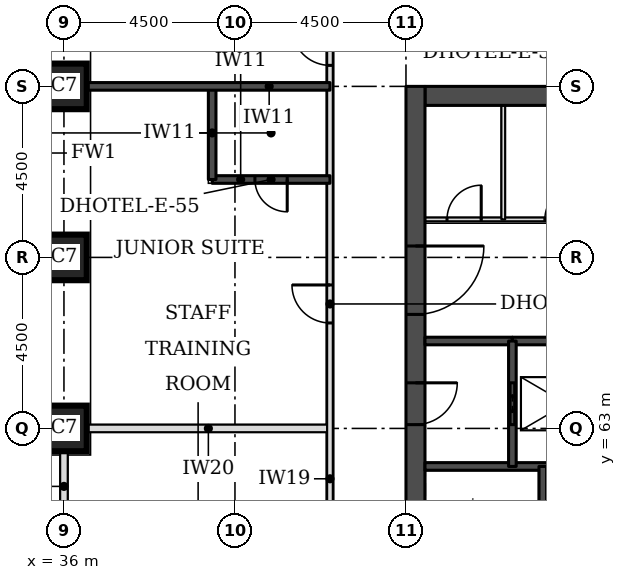
"""IFC4 building model, lengths in metres.
Left out: names, types, materials, properties, quantities, classifications, styles, units other than length and angle.
Written with IfcOpenShell. Run it as: python <this file> out.ifc"""

import sys

from ifc_helpers import new_model, si_unit, direction, frame, frame_2d, origin, origin_2d, place, context, subcontext, project, spatial, rectangle, extrude, element, fill, save


model = new_model("IFC4")
c1 = context("Model", 3, precision=1e-05, world=origin(), true_north=direction((0.0, 1.0)))
c2 = subcontext(c1, "Body", "Model", "MODEL_VIEW")
j1 = project(units=[si_unit("LENGTHUNIT", "METRE"), si_unit("PLANEANGLEUNIT", "RADIAN")], contexts=[c1])
p1 = place(None, origin())
s1 = spatial("IfcSite", under=j1, at=p1, CompositionType="ELEMENT")
p2 = place(p1, origin())
s2 = spatial("IfcBuilding", under=s1, at=p2, CompositionType="ELEMENT")
p3 = place(p2, frame((0.0, 0.0, 39.6)))
s3 = spatial("IfcBuildingStorey", under=s2, at=p3, CompositionType="ELEMENT", Elevation=39.6)
for number, where, z_axis, x_axis in (
    (1, (36.0, 63.0, 0.0), (0.0, 0.0, 1.0), (1.0, 0.0, 0.0)),
    (2, (36.0, 67.5, 0.0), (0.0, 0.0, 1.0), (1.0, 0.0, 0.0)),
    (3, (36.0, 72.0, 0.0), (0.0, 0.0, 1.0), (1.0, 0.0, 0.0)),
):
    element("IfcColumn", number, at=place(p3, frame(where, z_axis=z_axis, x_axis=x_axis)), inside=s3, PredefinedType="COLUMN", context=c2, shape_type="SweptSolid", body=[
        extrude(rectangle(XDim=1.2, YDim=1.2, at=origin_2d()), origin(), (0.0, 0.0, 1.0), 3.3),
    ])
p4 = place(p3, frame((45.5, 71.75, 0.0), z_axis=(0.0, 0.0, 1.0), x_axis=(1.0, 0.0, 0.0)))
e4 = element("IfcWall", 4, at=p4, inside=s3, PredefinedType="SHEAR", context=c2, shape_type="SweptSolid", body=[
    extrude(rectangle(XDim=21.5, YDim=0.5, at=frame_2d((10.75, 0.0))), origin(), (0.0, 0.0, 1.0), 3.3),
])
p5 = place(p3, frame((45.25, 49.5, 0.0), z_axis=(0.0, 0.0, 1.0), x_axis=(0.0, 1.0, 0.0)))
e5 = element("IfcWall", 5, at=p5, inside=s3, PredefinedType="SHEAR", context=c2, shape_type="SweptSolid", body=[
    extrude(rectangle(XDim=22.5, YDim=0.5, at=frame_2d((11.25, 0.0))), origin(), (0.0, 0.0, 1.0), 3.3),
])
p6 = place(p5, frame((4.2, 0.0, 0.0)))
e6 = element("IfcOpeningElement", 6, at=p6, cuts=e5, PredefinedType="OPENING", context=c2, shape_type="SweptSolid", body=[
    extrude(rectangle(XDim=1.8, YDim=2.1, at=frame_2d((0.9, 1.05))), frame((0.0, 0.26, 0.0), z_axis=(0.0, -1.0, 0.0), x_axis=(1.0, 0.0, 0.0)), (0.0, 0.0, 1.0), 0.52),
])
p7 = place(p5, frame((6.9, 0.0, 0.0)))
e7 = element("IfcOpeningElement", 7, at=p7, cuts=e5, PredefinedType="OPENING", context=c2, shape_type="SweptSolid", body=[
    extrude(rectangle(XDim=1.1, YDim=2.1, at=frame_2d((0.55, 1.05))), frame((0.0, 0.26, 0.0), z_axis=(0.0, -1.0, 0.0), x_axis=(1.0, 0.0, 0.0)), (0.0, 0.0, 1.0), 0.52),
])
p8 = place(p5, frame((13.6, 0.0, 0.0)))
e8 = element("IfcOpeningElement", 8, at=p8, cuts=e5, PredefinedType="OPENING", context=c2, shape_type="SweptSolid", body=[
    extrude(rectangle(XDim=1.1, YDim=2.1, at=frame_2d((0.55, 1.05))), frame((0.0, 0.26, 0.0), z_axis=(0.0, -1.0, 0.0), x_axis=(1.0, 0.0, 0.0)), (0.0, 0.0, 1.0), 0.52),
])
p9 = place(p5, frame((16.5, 0.0, 0.0)))
e9 = element("IfcOpeningElement", 9, at=p9, cuts=e5, PredefinedType="OPENING", context=c2, shape_type="SweptSolid", body=[
    extrude(rectangle(XDim=1.8, YDim=2.1, at=frame_2d((0.9, 1.05))), frame((0.0, 0.26, 0.0), z_axis=(0.0, -1.0, 0.0), x_axis=(1.0, 0.0, 0.0)), (0.0, 0.0, 1.0), 0.52),
])
p10 = place(p3, frame((36.0, 57.35, 0.0), z_axis=(0.0, 0.0, 1.0), x_axis=(0.0, 1.0, 0.0)))
e10 = element("IfcWall", 10, at=p10, inside=s3, PredefinedType="PARTITIONING", context=c2, shape_type="SweptSolid", body=[
    extrude(rectangle(XDim=5.05, YDim=0.2, at=frame_2d((2.525, 0.0))), origin(), (0.0, 0.0, 1.0), 2.33),
])
p11 = place(p3, frame((36.6, 63.0, 0.0), z_axis=(0.0, 0.0, 1.0), x_axis=(1.0, 0.0, 0.0)))
e11 = element("IfcWall", 11, at=p11, inside=s3, PredefinedType="PARTITIONING", context=c2, shape_type="SweptSolid", body=[
    extrude(rectangle(XDim=6.4, YDim=0.2, at=frame_2d((3.2, 0.0))), origin(), (0.0, 0.0, 1.0), 3.08),
])
p12 = place(p3, frame((43.0, 57.35, 0.0), z_axis=(0.0, 0.0, 1.0), x_axis=(0.0, 1.0, 0.0)))
e12 = element("IfcWall", 12, at=p12, inside=s3, PredefinedType="PARTITIONING", context=c2, shape_type="SweptSolid", body=[
    extrude(rectangle(XDim=16.65, YDim=0.15, at=frame_2d((8.325, 0.0))), origin(), (0.0, 0.0, 1.0), 3.08),
])
p13 = place(p12, frame((8.425, 0.0, 0.0)))
e13 = element("IfcOpeningElement", 13, at=p13, cuts=e12, PredefinedType="OPENING", context=c2, shape_type="SweptSolid", body=[
    extrude(rectangle(XDim=1.0, YDim=2.1, at=frame_2d((0.5, 1.05))), frame((0.0, 0.085, 0.0), z_axis=(0.0, -1.0, 0.0), x_axis=(1.0, 0.0, 0.0)), (0.0, 0.0, 1.0), 0.17),
])
p14 = place(p12, frame((15.203, 0.0, 0.0)))
e14 = element("IfcOpeningElement", 14, at=p14, cuts=e12, PredefinedType="OPENING", context=c2, shape_type="SweptSolid", body=[
    extrude(rectangle(XDim=1.0, YDim=2.1, at=frame_2d((0.5, 1.05))), frame((0.0, 0.085, 0.0), z_axis=(0.0, -1.0, 0.0), x_axis=(1.0, 0.0, 0.0)), (0.0, 0.0, 1.0), 0.17),
])
p15 = place(p3, frame((39.9, 69.55, 0.0), z_axis=(0.0, 0.0, 1.0), x_axis=(1.0, 0.0, 0.0)))
e15 = element("IfcWall", 15, at=p15, inside=s3, PredefinedType="SOLIDWALL", context=c2, shape_type="SweptSolid", body=[
    extrude(rectangle(XDim=3.1, YDim=0.2, at=frame_2d((1.55, 0.0))), origin(), (0.0, 0.0, 1.0), 3.08),
])
p16 = place(p15, frame((1.125, 0.0, 0.0)))
e16 = element("IfcOpeningElement", 16, at=p16, cuts=e15, PredefinedType="OPENING", context=c2, shape_type="SweptSolid", body=[
    extrude(rectangle(XDim=0.85, YDim=2.1, at=frame_2d((0.425, 1.05))), frame((0.0, 0.11, 0.0), z_axis=(0.0, -1.0, 0.0), x_axis=(1.0, 0.0, 0.0)), (0.0, 0.0, 1.0), 0.22),
])
p17 = place(p3, frame((39.9, 69.55, 0.0), z_axis=(0.0, 0.0, 1.0), x_axis=(0.0, 1.0, 0.0)))
e17 = element("IfcWall", 17, at=p17, inside=s3, PredefinedType="SOLIDWALL", context=c2, shape_type="SweptSolid", body=[
    extrude(rectangle(XDim=2.45, YDim=0.2, at=frame_2d((1.225, 0.0))), origin(), (0.0, 0.0, 1.0), 3.08),
])
p18 = place(p3, frame((36.6, 72.0, 0.0), z_axis=(0.0, 0.0, 1.0), x_axis=(1.0, 0.0, 0.0)))
e18 = element("IfcWall", 18, at=p18, inside=s3, PredefinedType="SOLIDWALL", context=c2, shape_type="SweptSolid", body=[
    extrude(rectangle(XDim=6.4, YDim=0.2, at=frame_2d((3.2, 0.0))), origin(), (0.0, 0.0, 1.0), 3.08),
])
p19 = place(p3, frame((45.5, 62.0, 0.0), z_axis=(0.0, 0.0, 1.0), x_axis=(1.0, 0.0, 0.0)))
e19 = element("IfcWall", 19, at=p19, inside=s3, PredefinedType="SOLIDWALL", context=c2, shape_type="SweptSolid", body=[
    extrude(rectangle(XDim=5.15, YDim=0.2, at=frame_2d((2.575, 0.0))), origin(), (0.0, 0.0, 1.0), 3.08),
])
p20 = place(p3, frame((45.5, 65.3, 0.0), z_axis=(0.0, 0.0, 1.0), x_axis=(1.0, 0.0, 0.0)))
e20 = element("IfcWall", 20, at=p20, inside=s3, PredefinedType="SOLIDWALL", context=c2, shape_type="SweptSolid", body=[
    extrude(rectangle(XDim=2.3, YDim=0.2, at=frame_2d((1.15, 0.0))), origin(), (0.0, 0.0, 1.0), 3.08),
])
p21 = place(p3, frame((47.8, 65.3, 0.0), z_axis=(0.0, 0.0, 1.0), x_axis=(1.0, 0.0, 0.0)))
e21 = element("IfcWall", 21, at=p21, inside=s3, PredefinedType="SOLIDWALL", context=c2, shape_type="SweptSolid", body=[
    extrude(rectangle(XDim=16.9, YDim=0.2, at=frame_2d((8.45, 0.0))), origin(), (0.0, 0.0, 1.0), 3.08),
])
p22 = place(p3, frame((45.5, 68.5, 0.0), z_axis=(0.0, 0.0, 1.0), x_axis=(1.0, 0.0, 0.0)))
e22 = element("IfcWall", 22, at=p22, inside=s3, PredefinedType="PARTITIONING", context=c2, shape_type="SweptSolid", body=[
    extrude(rectangle(XDim=5.15, YDim=0.1, at=frame_2d((2.575, 0.0))), origin(), (0.0, 0.0, 1.0), 3.08),
])
p23 = place(p22, frame((0.58, 0.0, 0.0)))
e23 = element("IfcOpeningElement", 23, at=p23, cuts=e22, PredefinedType="OPENING", context=c2, shape_type="SweptSolid", body=[
    extrude(rectangle(XDim=0.9, YDim=2.1, at=frame_2d((0.45, 1.05))), frame((0.0, 0.06, 0.0), z_axis=(0.0, -1.0, 0.0), x_axis=(1.0, 0.0, 0.0)), (0.0, 0.0, 1.0), 0.12),
])
p24 = place(p22, frame((3.155, 0.0, 0.0)))
e24 = element("IfcOpeningElement", 24, at=p24, cuts=e22, PredefinedType="OPENING", context=c2, shape_type="SweptSolid", body=[
    extrude(rectangle(XDim=0.9, YDim=2.1, at=frame_2d((0.45, 1.05))), frame((0.0, 0.06, 0.0), z_axis=(0.0, -1.0, 0.0), x_axis=(1.0, 0.0, 0.0)), (0.0, 0.0, 1.0), 0.12),
])
p25 = place(p3, frame((47.56, 68.5, 0.0), z_axis=(0.0, 0.0, 1.0), x_axis=(0.0, 1.0, 0.0)))
e25 = element("IfcWall", 25, at=p25, inside=s3, PredefinedType="PARTITIONING", context=c2, shape_type="SweptSolid", body=[
    extrude(rectangle(XDim=3.0, YDim=0.1, at=frame_2d((1.5, 0.0))), origin(), (0.0, 0.0, 1.0), 3.08),
])
p26 = place(p3, frame((47.8, 62.0, 0.0), z_axis=(0.0, 0.0, 1.0), x_axis=(0.0, 1.0, 0.0)))
e26 = element("IfcWall", 26, at=p26, inside=s3, PredefinedType="SOLIDWALL", context=c2, shape_type="SweptSolid", body=[
    extrude(rectangle(XDim=3.3, YDim=0.2, at=frame_2d((1.65, 0.0))), origin(), (0.0, 0.0, 1.0), 3.08),
])
p27 = place(p26, frame((1.1, 0.0, 0.0)))
e27 = element("IfcOpeningElement", 27, at=p27, cuts=e26, PredefinedType="OPENING", context=c2, shape_type="SweptSolid", body=[
    extrude(rectangle(XDim=1.1, YDim=2.1, at=frame_2d((0.55, 1.05))), frame((0.0, 0.11, 0.0), z_axis=(0.0, -1.0, 0.0), x_axis=(1.0, 0.0, 0.0)), (0.0, 0.0, 1.0), 0.22),
])
p28 = place(p3, frame((48.6, 56.2, 0.0), z_axis=(0.0, 0.0, 1.0), x_axis=(0.0, 1.0, 0.0)))
e28 = element("IfcWall", 28, at=p28, inside=s3, PredefinedType="SOLIDWALL", context=c2, shape_type="SweptSolid", body=[
    extrude(rectangle(XDim=5.8, YDim=0.2, at=frame_2d((2.9, 0.0))), origin(), (0.0, 0.0, 1.0), 3.08),
])
p29 = place(p13, origin())
e29 = element("IfcDoor", 29, at=p29, inside=s3, OperationType="SINGLE_SWING_RIGHT", PredefinedType="DOOR", context=c2, shape_type="SweptSolid", body=[
    extrude(rectangle(XDim=1.0, YDim=2.1, at=frame_2d((0.5, 1.05))), frame((0.0, 0.025, 0.0), z_axis=(0.0, -1.0, 0.0), x_axis=(1.0, 0.0, 0.0)), (0.0, 0.0, 1.0), 0.05),
])
fill(e13, e29)
p30 = place(p16, frame((0.85, 0.0, 0.0), z_axis=(0.0, 0.0, 1.0), x_axis=(-1.0, 0.0, 0.0)))
e30 = element("IfcDoor", 30, at=p30, inside=s3, OperationType="SINGLE_SWING_LEFT", PredefinedType="DOOR", context=c2, shape_type="SweptSolid", body=[
    extrude(rectangle(XDim=0.85, YDim=2.1, at=frame_2d((0.425, 1.05))), frame((0.0, 0.025, 0.0), z_axis=(0.0, -1.0, 0.0), x_axis=(1.0, 0.0, 0.0)), (0.0, 0.0, 1.0), 0.05),
])
fill(e16, e30)
p31 = place(p14, origin())
e31 = element("IfcDoor", 31, at=p31, inside=s3, OperationType="SINGLE_SWING_RIGHT", PredefinedType="DOOR", context=c2, shape_type="SweptSolid", body=[
    extrude(rectangle(XDim=1.0, YDim=2.1, at=frame_2d((0.5, 1.05))), frame((0.0, 0.025, 0.0), z_axis=(0.0, -1.0, 0.0), x_axis=(1.0, 0.0, 0.0)), (0.0, 0.0, 1.0), 0.05),
])
fill(e14, e31)
p32 = place(p27, origin())
e32 = element("IfcDoor", 32, at=p32, inside=s3, OperationType="DOUBLE_DOOR_SLIDING", PredefinedType="DOOR", context=c2, shape_type="SweptSolid", body=[
    extrude(rectangle(XDim=1.1, YDim=2.1, at=frame_2d((0.55, 1.05))), frame((0.0, 0.025, 0.0), z_axis=(0.0, -1.0, 0.0), x_axis=(1.0, 0.0, 0.0)), (0.0, 0.0, 1.0), 0.05),
])
fill(e27, e32)
p33 = place(p8, frame((1.1, 0.0, 0.0), z_axis=(0.0, 0.0, 1.0), x_axis=(-1.0, 0.0, 0.0)))
e33 = element("IfcDoor", 33, at=p33, inside=s3, OperationType="SINGLE_SWING_LEFT", PredefinedType="DOOR", context=c2, shape_type="SweptSolid", body=[
    extrude(rectangle(XDim=1.1, YDim=2.1, at=frame_2d((0.55, 1.05))), frame((0.0, 0.025, 0.0), z_axis=(0.0, -1.0, 0.0), x_axis=(1.0, 0.0, 0.0)), (0.0, 0.0, 1.0), 0.05),
])
fill(e8, e33)
p34 = place(p9, frame((1.8, 0.0, 0.0), z_axis=(0.0, 0.0, 1.0), x_axis=(-1.0, 0.0, 0.0)))
e34 = element("IfcDoor", 34, at=p34, inside=s3, OperationType="SINGLE_SWING_LEFT", PredefinedType="DOOR", context=c2, shape_type="SweptSolid", body=[
    extrude(rectangle(XDim=1.8, YDim=2.1, at=frame_2d((0.9, 1.05))), frame((0.0, 0.025, 0.0), z_axis=(0.0, -1.0, 0.0), x_axis=(1.0, 0.0, 0.0)), (0.0, 0.0, 1.0), 0.05),
])
fill(e9, e34)
p35 = place(p23, origin())
e35 = element("IfcDoor", 35, at=p35, inside=s3, OperationType="SINGLE_SWING_RIGHT", PredefinedType="DOOR", context=c2, shape_type="SweptSolid", body=[
    extrude(rectangle(XDim=0.9, YDim=2.1, at=frame_2d((0.45, 1.05))), frame((0.0, 0.025, 0.0), z_axis=(0.0, -1.0, 0.0), x_axis=(1.0, 0.0, 0.0)), (0.0, 0.0, 1.0), 0.05),
])
fill(e23, e35)
p36 = place(p24, origin())
e36 = element("IfcDoor", 36, at=p36, inside=s3, OperationType="SINGLE_SWING_RIGHT", PredefinedType="DOOR", context=c2, shape_type="SweptSolid", body=[
    extrude(rectangle(XDim=0.9, YDim=2.1, at=frame_2d((0.45, 1.05))), frame((0.0, 0.025, 0.0), z_axis=(0.0, -1.0, 0.0), x_axis=(1.0, 0.0, 0.0)), (0.0, 0.0, 1.0), 0.05),
])
fill(e24, e36)
save(model, sys.argv[1])
